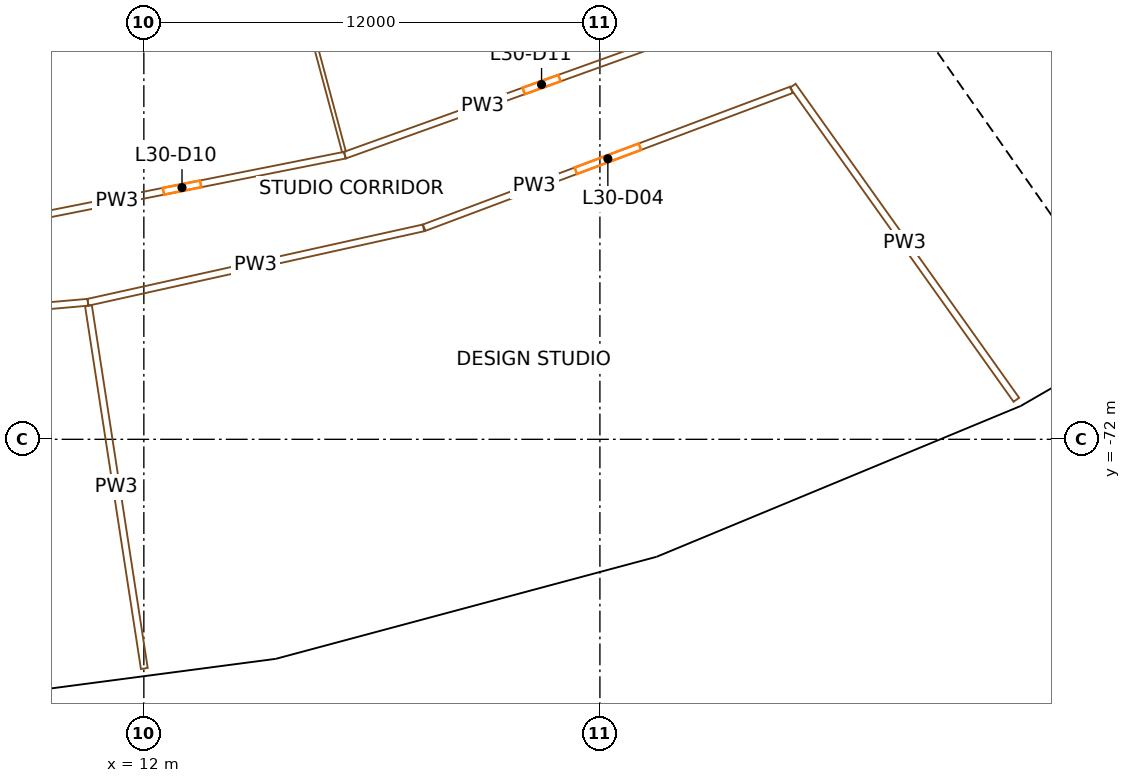
"""IFC4 building model, lengths in metres.
Left out: names, types, materials, properties, quantities, classifications, styles, units other than length and angle.
Written with IfcOpenShell. Run it as: python <this file> out.ifc"""

import sys

from ifc_helpers import new_model, si_unit, direction, frame, frame_2d, origin, origin_2d, place, context, subcontext, project, spatial, rectangle, extrude, element, fill, save


model = new_model("IFC4")
c1 = context("Model", 3, precision=1e-05, world=origin(), true_north=direction((0.0, 1.0)))
c2 = subcontext(c1, "Body", "Model", "MODEL_VIEW")
j1 = project(units=[si_unit("LENGTHUNIT", "METRE"), si_unit("PLANEANGLEUNIT", "RADIAN")], contexts=[c1])
p1 = place(None, origin())
s1 = spatial("IfcSite", under=j1, at=p1, CompositionType="ELEMENT")
p2 = place(p1, origin())
s2 = spatial("IfcBuilding", under=s1, at=p2, CompositionType="ELEMENT")
p3 = place(p2, frame((0.0, 0.0, 132.9)))
s3 = spatial("IfcBuildingStorey", under=s2, at=p3, CompositionType="ELEMENT", Elevation=132.9)
for number, where, z_axis, x_axis in (
    (1, (15.168, -76.256, 0.0), (0.0, 0.0, 1.0), (0.981, 0.195, 0.0)),
    (2, (24.992, -73.624, 0.0), (0.0, 0.0, 1.0), (0.947, 0.321, 0.0)),
    (3, (34.388, -69.732, 0.0), (0.0, 0.0, 1.0), (0.897, 0.442, 0.0)),
):
    element("IfcColumn", number, at=place(p3, frame(where, z_axis=z_axis, x_axis=x_axis)), inside=s3, PredefinedType="COLUMN", context=c2, shape_type="SweptSolid", body=[
        extrude(rectangle(XDim=1.2, YDim=1.5, at=origin_2d()), origin(), (0.0, 0.0, 1.0), 3.8),
    ])
p4 = place(p3, frame((36.717, -66.337, 0.0), z_axis=(0.0, 0.0, 1.0), x_axis=(-0.573577477574, 0.819151315216, 0.0)))
e4 = element("IfcWall", 4, at=p4, inside=s3, PredefinedType="SHEAR", context=c2, shape_type="SweptSolid", body=[
    extrude(rectangle(XDim=14.8, YDim=0.9, at=frame_2d((7.4, 0.0))), origin(), (0.0, 0.0, 1.0), 3.5),
])
p5 = place(p4, frame((6.2, 0.0, 0.0)))
e5 = element("IfcOpeningElement", 5, at=p5, cuts=e4, PredefinedType="OPENING", context=c2, shape_type="SweptSolid", body=[
    extrude(rectangle(XDim=2.4, YDim=2.1, at=frame_2d((1.2, 1.05))), frame((0.0, 0.46, 0.0), z_axis=(0.0, -1.0, 0.0), x_axis=(1.0, 0.0, 0.0)), (0.0, 0.0, 1.0), 0.92),
])
p6 = place(p3, frame((35.221, -63.417, 0.0), z_axis=(0.0, 0.0, 1.0), x_axis=(0.819166993208, 0.573555086491, 0.0)))
e6 = element("IfcWall", 6, at=p6, inside=s3, PredefinedType="SOLIDWALL", context=c2, shape_type="SweptSolid", body=[
    extrude(rectangle(XDim=7.95, YDim=0.3, at=frame_2d((3.975, 0.0))), origin(), (0.0, 0.0, 1.0), 3.5),
])
p7 = place(p3, frame((10.529, -68.394, 0.0), z_axis=(0.0, 0.0, 1.0), x_axis=(-0.996190935779, -0.087198735491, 0.0)))
e7 = element("IfcWall", 7, at=p7, inside=s3, PredefinedType="PARTITIONING", context=c2, shape_type="SweptSolid", body=[
    extrude(rectangle(XDim=9.052, YDim=0.18, at=frame_2d((4.526, 0.0))), origin(), (0.0, 0.0, 1.0), 2.4),
])
p8 = place(p7, frame((4.026, 0.0, 0.0)))
e8 = element("IfcOpeningElement", 8, at=p8, cuts=e7, PredefinedType="OPENING", context=c2, shape_type="SweptSolid", body=[
    extrude(rectangle(XDim=1.0, YDim=2.1, at=frame_2d((0.5, 1.05))), frame((0.0, 0.1, 0.0), z_axis=(0.0, -1.0, 0.0), x_axis=(1.0, 0.0, 0.0)), (0.0, 0.0, 1.0), 0.2),
])
p9 = place(p3, frame((8.719, -66.229, 0.0), z_axis=(0.0, 0.0, 1.0), x_axis=(0.980786466832, 0.195084357342, 0.0)))
e9 = element("IfcWall", 9, at=p9, inside=s3, PredefinedType="PARTITIONING", context=c2, shape_type="SweptSolid", body=[
    extrude(rectangle(XDim=8.738, YDim=0.18, at=frame_2d((4.369, 0.0))), origin(), (0.0, 0.0, 1.0), 2.4),
])
p10 = place(p9, frame((3.869, 0.0, 0.0)))
e10 = element("IfcOpeningElement", 10, at=p10, cuts=e9, PredefinedType="OPENING", context=c2, shape_type="SweptSolid", body=[
    extrude(rectangle(XDim=1.0, YDim=2.1, at=frame_2d((0.5, 1.05))), frame((0.0, 0.1, 0.0), z_axis=(0.0, -1.0, 0.0), x_axis=(1.0, 0.0, 0.0)), (0.0, 0.0, 1.0), 0.2),
])
p11 = place(p3, frame((10.529, -68.394, 0.0), z_axis=(0.0, 0.0, 1.0), x_axis=(0.976293034631, 0.216453021533, 0.0)))
e11 = element("IfcWall", 11, at=p11, inside=s3, PredefinedType="PARTITIONING", context=c2, shape_type="SweptSolid", body=[
    extrude(rectangle(XDim=9.042, YDim=0.18, at=frame_2d((4.521, 0.0))), origin(), (0.0, 0.0, 1.0), 2.4),
])
p12 = place(p3, frame((12.012, -78.03, 0.0), z_axis=(0.0, 0.0, 1.0), x_axis=(-0.152159747281, 0.988355913276, 0.0)))
e12 = element("IfcWall", 12, at=p12, inside=s3, PredefinedType="PARTITIONING", context=c2, shape_type="SweptSolid", body=[
    extrude(rectangle(XDim=9.659, YDim=0.18, at=frame_2d((4.83, 0.0))), origin(), (0.0, 0.0, 1.0), 2.4),
])
p13 = place(p3, frame((14.747, -55.037, 0.0), z_axis=(0.0, 0.0, 1.0), x_axis=(0.258828880572, -0.965923190829, 0.0)))
e13 = element("IfcWall", 13, at=p13, inside=s3, PredefinedType="PARTITIONING", context=c2, shape_type="SweptSolid", body=[
    extrude(rectangle(XDim=9.731, YDim=0.1, at=frame_2d((4.866, 0.0))), origin(), (0.0, 0.0, 1.0), 2.4),
])
p14 = place(p3, frame((17.289, -64.524, 0.0), z_axis=(0.0, 0.0, 1.0), x_axis=(0.941150861554, 0.337986768669, 0.0)))
e14 = element("IfcWall", 14, at=p14, inside=s3, PredefinedType="PARTITIONING", context=c2, shape_type="SweptSolid", body=[
    extrude(rectangle(XDim=10.998, YDim=0.18, at=frame_2d((5.499, 0.0))), origin(), (0.0, 0.0, 1.0), 2.4),
])
p15 = place(p14, frame((4.999, 0.0, 0.0)))
e15 = element("IfcOpeningElement", 15, at=p15, cuts=e14, PredefinedType="OPENING", context=c2, shape_type="SweptSolid", body=[
    extrude(rectangle(XDim=1.0, YDim=2.1, at=frame_2d((0.5, 1.05))), frame((0.0, 0.1, 0.0), z_axis=(0.0, -1.0, 0.0), x_axis=(1.0, 0.0, 0.0)), (0.0, 0.0, 1.0), 0.2),
])
p16 = place(p3, frame((29.043, -62.803, 0.0), z_axis=(0.0, 0.0, 1.0), x_axis=(-0.936226153734, -0.351398049318, 0.0)))
e16 = element("IfcWall", 16, at=p16, inside=s3, PredefinedType="PARTITIONING", context=c2, shape_type="SweptSolid", body=[
    extrude(rectangle(XDim=10.327, YDim=0.18, at=frame_2d((5.164, 0.0))), origin(), (0.0, 0.0, 1.0), 2.4),
])
p17 = place(p16, frame((4.263, 0.0, 0.0)))
e17 = element("IfcOpeningElement", 17, at=p17, cuts=e16, PredefinedType="OPENING", context=c2, shape_type="SweptSolid", body=[
    extrude(rectangle(XDim=1.8, YDim=2.1, at=frame_2d((0.9, 1.05))), frame((0.0, 0.1, 0.0), z_axis=(0.0, -1.0, 0.0), x_axis=(1.0, 0.0, 0.0)), (0.0, 0.0, 1.0), 0.2),
])
p18 = place(p3, frame((29.075, -62.698, 0.0), z_axis=(0.0, 0.0, 1.0), x_axis=(0.58002146853, -0.814601188339, 0.0)))
e18 = element("IfcWall", 18, at=p18, inside=s3, PredefinedType="PARTITIONING", context=c2, shape_type="SweptSolid", body=[
    extrude(rectangle(XDim=10.141, YDim=0.18, at=frame_2d((5.071, 0.0))), origin(), (0.0, 0.0, 1.0), 2.4),
])
p19 = place(p17, origin())
e19 = element("IfcDoor", 19, at=p19, inside=s3, OperationType="DOUBLE_DOOR_SINGLE_SWING", PredefinedType="DOOR", context=c2, shape_type="SweptSolid", body=[
    extrude(rectangle(XDim=1.8, YDim=2.1, at=frame_2d((0.9, 1.05))), frame((0.0, 0.025, 0.0), z_axis=(0.0, -1.0, 0.0), x_axis=(1.0, 0.0, 0.0)), (0.0, 0.0, 1.0), 0.05),
])
fill(e17, e19)
p20 = place(p10, origin())
e20 = element("IfcDoor", 20, at=p20, inside=s3, OperationType="SINGLE_SWING_RIGHT", PredefinedType="DOOR", context=c2, shape_type="SweptSolid", body=[
    extrude(rectangle(XDim=1.0, YDim=2.1, at=frame_2d((0.5, 1.05))), frame((0.0, 0.025, 0.0), z_axis=(0.0, -1.0, 0.0), x_axis=(1.0, 0.0, 0.0)), (0.0, 0.0, 1.0), 0.05),
])
fill(e10, e20)
p21 = place(p15, origin())
e21 = element("IfcDoor", 21, at=p21, inside=s3, OperationType="SINGLE_SWING_RIGHT", PredefinedType="DOOR", context=c2, shape_type="SweptSolid", body=[
    extrude(rectangle(XDim=1.0, YDim=2.1, at=frame_2d((0.5, 1.05))), frame((0.0, 0.025, 0.0), z_axis=(0.0, -1.0, 0.0), x_axis=(1.0, 0.0, 0.0)), (0.0, 0.0, 1.0), 0.05),
])
fill(e15, e21)
save(model, sys.argv[1])
